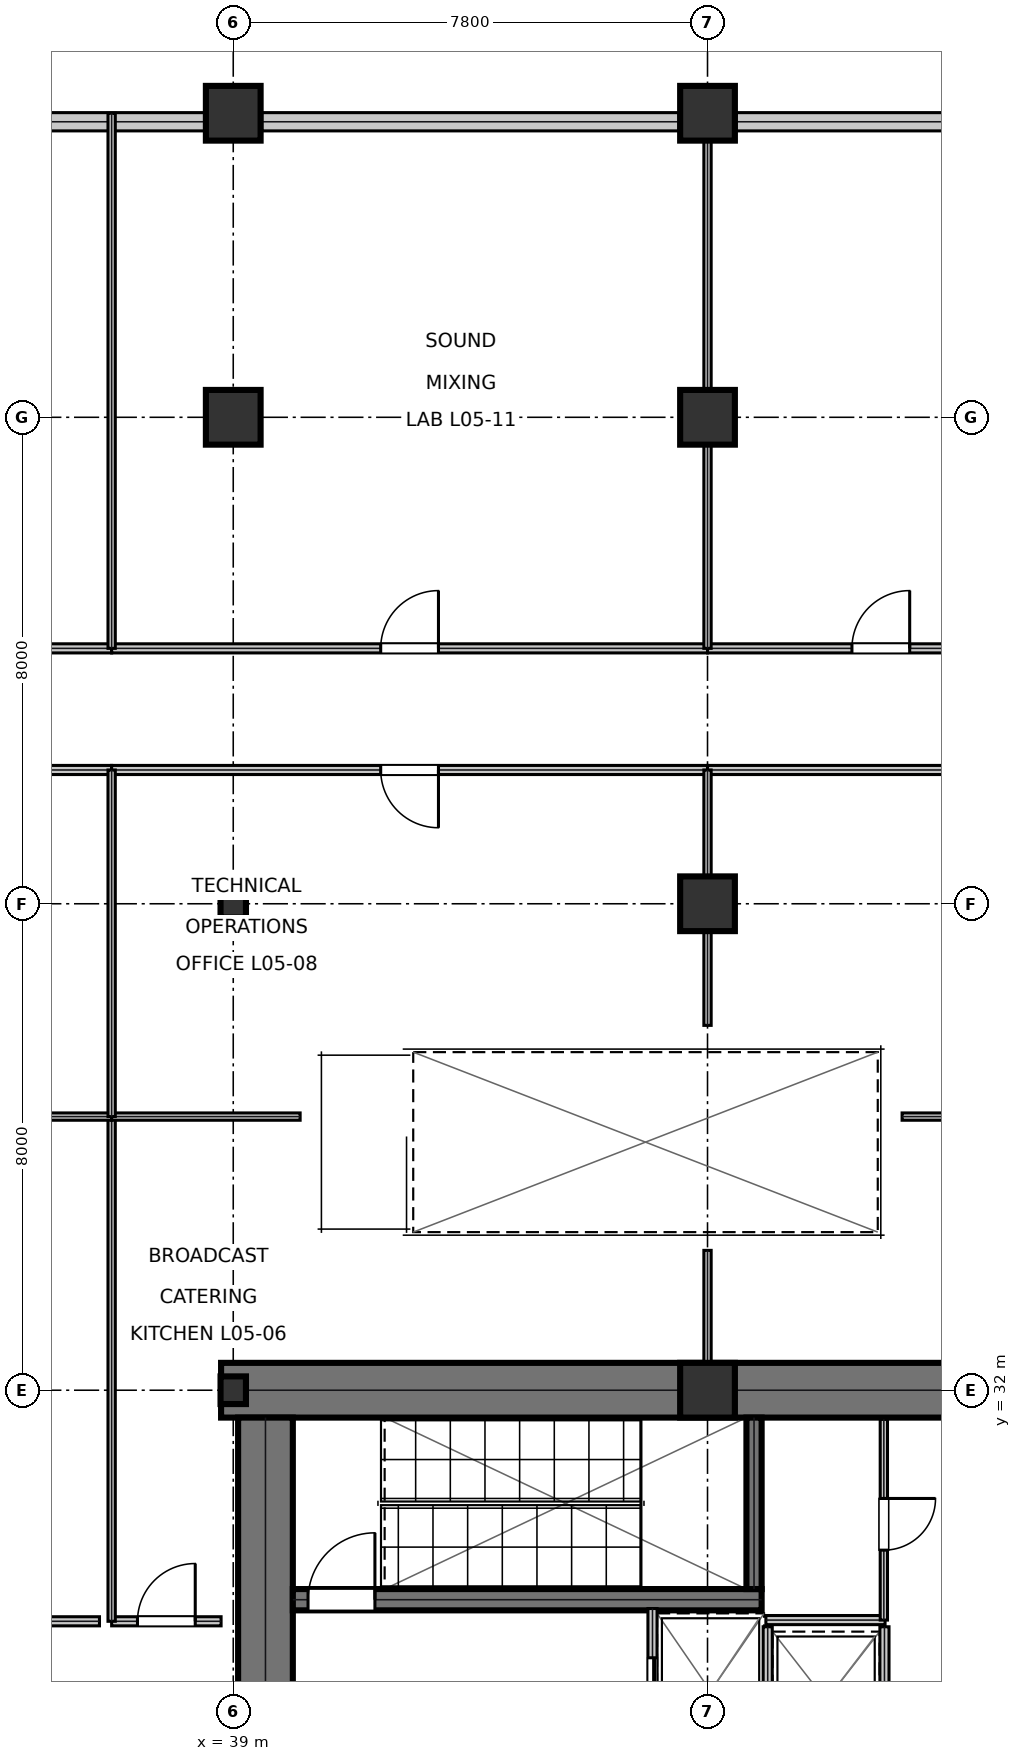
"""IFC4 building model, lengths in metres.
Left out: names, types, materials, properties, quantities, classifications, styles, units other than length and angle.
Written with IfcOpenShell. Run it as: python <this file> out.ifc"""

import sys

from ifc_helpers import new_model, si_unit, direction, frame, frame_2d, origin, origin_2d, place, context, subcontext, project, spatial, rectangle, i_section, extrude, element, fill, save


model = new_model("IFC4")
c1 = context("Model", 3, precision=1e-05, world=origin(), true_north=direction((0.0, 1.0)))
c2 = subcontext(c1, "Body", "Model", "MODEL_VIEW")
j1 = project(units=[si_unit("LENGTHUNIT", "METRE"), si_unit("PLANEANGLEUNIT", "RADIAN")], contexts=[c1])
p1 = place(None, origin())
s1 = spatial("IfcSite", under=j1, at=p1, CompositionType="ELEMENT")
p2 = place(p1, origin())
s2 = spatial("IfcBuilding", under=s1, at=p2, CompositionType="ELEMENT")
p3 = place(p2, frame((0.0, 0.0, 27.0)))
s3 = spatial("IfcBuildingStorey", under=s2, at=p3, CompositionType="ELEMENT", Elevation=27.0)
p4 = place(p3, frame((38.8, 32.0, 0.0), z_axis=(0.0, 0.0, 1.0), x_axis=(1.0, 0.0, 0.0)))
e1 = element("IfcWall", 1, at=p4, inside=s3, PredefinedType="SHEAR", context=c2, shape_type="SweptSolid", body=[
    extrude(rectangle(XDim=16.0, YDim=0.9, at=frame_2d((8.0, 0.0))), origin(), (0.0, 0.0, 1.0), 5.08),
])
p5 = place(p3, frame((39.53, 25.4, 0.0), z_axis=(0.0, 0.0, 1.0), x_axis=(0.0, 1.0, 0.0)))
e2 = element("IfcWall", 2, at=p5, inside=s3, PredefinedType="SHEAR", context=c2, shape_type="SweptSolid", body=[
    extrude(rectangle(XDim=6.15, YDim=0.9, at=frame_2d((3.075, 0.0))), origin(), (0.0, 0.0, 1.0), 5.08),
])
p6 = place(p3, frame((39.98, 28.555, 0.0), z_axis=(0.0, 0.0, 1.0), x_axis=(1.0, 0.0, 0.0)))
e3 = element("IfcWall", 3, at=p6, inside=s3, PredefinedType="SHEAR", context=c2, shape_type="SweptSolid", body=[
    extrude(rectangle(XDim=7.71, YDim=0.35, at=frame_2d((3.855, 0.0))), origin(), (0.0, 0.0, 1.0), 5.08),
])
p7 = place(p6, frame((0.25, 0.0, 0.0)))
e4 = element("IfcOpeningElement", 4, at=p7, cuts=e3, PredefinedType="OPENING", context=c2, shape_type="SweptSolid", body=[
    extrude(rectangle(XDim=1.1, YDim=2.15, at=frame_2d((0.55, 1.075))), frame((0.0, 0.185, 0.0), z_axis=(0.0, -1.0, 0.0), x_axis=(1.0, 0.0, 0.0)), (0.0, 0.0, 1.0), 0.37),
])
p8 = place(p3, frame((47.565, 28.73, 0.0), z_axis=(0.0, 0.0, 1.0), x_axis=(0.0, 1.0, 0.0)))
e5 = element("IfcWall", 5, at=p8, inside=s3, PredefinedType="SHEAR", context=c2, shape_type="SweptSolid", body=[
    extrude(rectangle(XDim=2.82, YDim=0.25, at=frame_2d((1.41, 0.0))), origin(), (0.0, 0.0, 1.0), 5.08),
])
for number, where, z_axis, x_axis in (
    (6, (39.0, 32.0, 0.0), (0.0, 0.0, 1.0), (1.0, 0.0, 0.0)),
    (7, (39.0, 40.0, 0.0), (0.0, 0.0, 1.0), (1.0, 0.0, 0.0)),
):
    element("IfcColumn", number, at=place(p3, frame(where, z_axis=z_axis, x_axis=x_axis)), inside=s3, PredefinedType="COLUMN", context=c2, shape_type="SweptSolid", body=[
        extrude(i_section(OverallWidth=0.418, OverallDepth=0.455, WebThickness=0.042, FlangeThickness=0.068, at=origin_2d()), origin(), (0.0, 0.0, 1.0), 5.395),
    ])
for number, where, z_axis, x_axis in (
    (8, (39.0, 48.0, 0.0), (0.0, 0.0, 1.0), (1.0, 0.0, 0.0)),
    (9, (39.0, 53.0, 0.0), (0.0, 0.0, 1.0), (1.0, 0.0, 0.0)),
    (10, (46.8, 32.0, 0.0), (0.0, 0.0, 1.0), (1.0, 0.0, 0.0)),
    (11, (46.8, 40.0, 0.0), (0.0, 0.0, 1.0), (1.0, 0.0, 0.0)),
    (12, (46.8, 48.0, 0.0), (0.0, 0.0, 1.0), (1.0, 0.0, 0.0)),
    (13, (46.8, 53.0, 0.0), (0.0, 0.0, 1.0), (1.0, 0.0, 0.0)),
):
    element("IfcColumn", number, at=place(p3, frame(where, z_axis=z_axis, x_axis=x_axis)), inside=s3, PredefinedType="COLUMN", context=c2, shape_type="SweptSolid", body=[
        extrude(rectangle(XDim=0.9, YDim=0.9, at=origin_2d()), origin(), (0.0, 0.0, 1.0), 5.395),
    ])
for number, where, z_axis, x_axis in (
    (14, (54.132, 52.86, 0.0), (0.0, 0.0, 1.0), (-1.0, 0.0, 0.0)),
    (15, (46.332, 52.86, 0.0), (0.0, 0.0, 1.0), (-1.0, 0.0, 0.0)),
    (16, (38.532, 52.86, 0.0), (0.0, 0.0, 1.0), (-1.0, 0.0, 0.0)),
):
    element("IfcWall", number, at=place(p3, frame(where, z_axis=z_axis, x_axis=x_axis)), inside=s3, PredefinedType="STANDARD", context=c2, shape_type="SweptSolid", body=[
        extrude(rectangle(XDim=6.864, YDim=0.3, at=frame_2d((3.432, 0.0))), origin(), (0.0, 0.0, 1.0), 4.608),
    ])
p9 = place(p3, frame((45.895, 25.69, 0.0), z_axis=(0.0, 0.0, 1.0), x_axis=(0.0, 1.0, 0.0)))
e17 = element("IfcWall", 17, at=p9, inside=s3, PredefinedType="PARTITIONING", context=c2, shape_type="SweptSolid", body=[
    extrude(rectangle(XDim=2.72, YDim=0.15, at=frame_2d((1.36, 0.0))), origin(), (0.0, 0.0, 1.0), 5.08),
])
p10 = place(p9, frame((0.81, 0.0, 0.0)))
e18 = element("IfcOpeningElement", 18, at=p10, cuts=e17, PredefinedType="OPENING", context=c2, shape_type="SweptSolid", body=[
    extrude(rectangle(XDim=1.1, YDim=2.15, at=frame_2d((0.55, 1.075))), frame((0.0, 0.085, 0.0), z_axis=(0.0, -1.0, 0.0), x_axis=(1.0, 0.0, 0.0)), (0.0, 0.0, 1.0), 0.17),
])
for number, where, z_axis, x_axis in (
    (19, (47.79, 25.695, 0.0), (0.0, 0.0, 1.0), (0.0, 1.0, 0.0)),
    (20, (49.71, 25.695, 0.0), (0.0, 0.0, 1.0), (0.0, 1.0, 0.0)),
):
    element("IfcWall", number, at=place(p3, frame(where, z_axis=z_axis, x_axis=x_axis)), inside=s3, PredefinedType="PARTITIONING", context=c2, shape_type="SweptSolid", body=[
        extrude(rectangle(XDim=2.415, YDim=0.15, at=frame_2d((1.208, 0.0))), origin(), (0.0, 0.0, 1.0), 5.08),
    ])
p11 = place(p3, frame((47.76, 28.22, 0.0), z_axis=(0.0, 0.0, 1.0), x_axis=(1.0, 0.0, 0.0)))
e21 = element("IfcWall", 21, at=p11, inside=s3, PredefinedType="PARTITIONING", context=c2, shape_type="SweptSolid", body=[
    extrude(rectangle(XDim=1.96, YDim=0.15, at=frame_2d((0.98, 0.0))), origin(), (0.0, 0.0, 1.0), 5.08),
])
p12 = place(p3, frame((49.7, 28.22, 0.0), z_axis=(0.0, 0.0, 1.0), x_axis=(0.0, 1.0, 0.0)))
e22 = element("IfcWall", 22, at=p12, inside=s3, PredefinedType="PARTITIONING", context=c2, shape_type="SweptSolid", body=[
    extrude(rectangle(XDim=3.3, YDim=0.12, at=frame_2d((1.65, 0.0))), origin(), (0.0, 0.0, 1.0), 5.08),
])
p13 = place(p12, frame((1.15, 0.0, 0.0)))
e23 = element("IfcOpeningElement", 23, at=p13, cuts=e22, PredefinedType="OPENING", context=c2, shape_type="SweptSolid", body=[
    extrude(rectangle(XDim=0.85, YDim=2.15, at=frame_2d((0.425, 1.075))), frame((0.0, 0.07, 0.0), z_axis=(0.0, -1.0, 0.0), x_axis=(1.0, 0.0, 0.0)), (0.0, 0.0, 1.0), 0.14),
])
p14 = place(p3, frame((28.2, 28.2, 0.0), z_axis=(0.0, 0.0, 1.0), x_axis=(1.0, 0.0, 0.0)))
e24 = element("IfcWall", 24, at=p14, inside=s3, PredefinedType="PARTITIONING", context=c2, shape_type="SweptSolid", body=[
    extrude(rectangle(XDim=8.6, YDim=0.15, at=frame_2d((4.3, 0.0))), origin(), (0.0, 0.0, 1.0), 4.375),
])
p15 = place(p14, frame((3.825, 0.0, 0.0)))
e25 = element("IfcOpeningElement", 25, at=p15, cuts=e24, PredefinedType="OPENING", context=c2, shape_type="SweptSolid", body=[
    extrude(rectangle(XDim=0.95, YDim=2.15, at=frame_2d((0.475, 1.075))), frame((0.0, 0.085, 0.0), z_axis=(0.0, -1.0, 0.0), x_axis=(1.0, 0.0, 0.0)), (0.0, 0.0, 1.0), 0.17),
])
p16 = place(p3, frame((37.0, 28.2, 0.0), z_axis=(0.0, 0.0, 1.0), x_axis=(1.0, 0.0, 0.0)))
e26 = element("IfcWall", 26, at=p16, inside=s3, PredefinedType="PARTITIONING", context=c2, shape_type="SweptSolid", body=[
    extrude(rectangle(XDim=1.8, YDim=0.15, at=frame_2d((0.9, 0.0))), origin(), (0.0, 0.0, 1.0), 5.08),
])
p17 = place(p16, frame((0.425, 0.0, 0.0)))
e27 = element("IfcOpeningElement", 27, at=p17, cuts=e26, PredefinedType="OPENING", context=c2, shape_type="SweptSolid", body=[
    extrude(rectangle(XDim=0.95, YDim=2.15, at=frame_2d((0.475, 1.075))), frame((0.0, 0.085, 0.0), z_axis=(0.0, -1.0, 0.0), x_axis=(1.0, 0.0, 0.0)), (0.0, 0.0, 1.0), 0.17),
])
p18 = place(p3, frame((28.2, 42.2, 0.0), z_axis=(0.0, 0.0, 1.0), x_axis=(1.0, 0.0, 0.0)))
e28 = element("IfcWall", 28, at=p18, inside=s3, PredefinedType="PARTITIONING", context=c2, shape_type="SweptSolid", body=[
    extrude(rectangle(XDim=8.8, YDim=0.15, at=frame_2d((4.4, 0.0))), origin(), (0.0, 0.0, 1.0), 4.375),
])
p19 = place(p18, frame((3.925, 0.0, 0.0)))
e29 = element("IfcOpeningElement", 29, at=p19, cuts=e28, PredefinedType="OPENING", context=c2, shape_type="SweptSolid", body=[
    extrude(rectangle(XDim=0.95, YDim=2.15, at=frame_2d((0.475, 1.075))), frame((0.0, 0.085, 0.0), z_axis=(0.0, -1.0, 0.0), x_axis=(1.0, 0.0, 0.0)), (0.0, 0.0, 1.0), 0.17),
])
p20 = place(p3, frame((37.0, 42.2, 0.0), z_axis=(0.0, 0.0, 1.0), x_axis=(1.0, 0.0, 0.0)))
e30 = element("IfcWall", 30, at=p20, inside=s3, PredefinedType="PARTITIONING", context=c2, shape_type="SweptSolid", body=[
    extrude(rectangle(XDim=9.8, YDim=0.15, at=frame_2d((4.9, 0.0))), origin(), (0.0, 0.0, 1.0), 4.375),
])
p21 = place(p20, frame((4.425, 0.0, 0.0)))
e31 = element("IfcOpeningElement", 31, at=p21, cuts=e30, PredefinedType="OPENING", context=c2, shape_type="SweptSolid", body=[
    extrude(rectangle(XDim=0.95, YDim=2.15, at=frame_2d((0.475, 1.075))), frame((0.0, 0.085, 0.0), z_axis=(0.0, -1.0, 0.0), x_axis=(1.0, 0.0, 0.0)), (0.0, 0.0, 1.0), 0.17),
])
p22 = place(p3, frame((46.8, 44.2, 0.0), z_axis=(0.0, 0.0, 1.0), x_axis=(1.0, 0.0, 0.0)))
e32 = element("IfcWall", 32, at=p22, inside=s3, PredefinedType="PARTITIONING", context=c2, shape_type="SweptSolid", body=[
    extrude(rectangle(XDim=5.7, YDim=0.15, at=frame_2d((2.85, 0.0))), origin(), (0.0, 0.0, 1.0), 4.375),
])
p23 = place(p22, frame((2.375, 0.0, 0.0)))
e33 = element("IfcOpeningElement", 33, at=p23, cuts=e32, PredefinedType="OPENING", context=c2, shape_type="SweptSolid", body=[
    extrude(rectangle(XDim=0.95, YDim=2.15, at=frame_2d((0.475, 1.075))), frame((0.0, 0.085, 0.0), z_axis=(0.0, -1.0, 0.0), x_axis=(1.0, 0.0, 0.0)), (0.0, 0.0, 1.0), 0.17),
])
p24 = place(p3, frame((28.2, 44.2, 0.0), z_axis=(0.0, 0.0, 1.0), x_axis=(1.0, 0.0, 0.0)))
e34 = element("IfcWall", 34, at=p24, inside=s3, PredefinedType="PARTITIONING", context=c2, shape_type="SweptSolid", body=[
    extrude(rectangle(XDim=8.8, YDim=0.15, at=frame_2d((4.4, 0.0))), origin(), (0.0, 0.0, 1.0), 4.375),
])
p25 = place(p24, frame((3.925, 0.0, 0.0)))
e35 = element("IfcOpeningElement", 35, at=p25, cuts=e34, PredefinedType="OPENING", context=c2, shape_type="SweptSolid", body=[
    extrude(rectangle(XDim=0.95, YDim=2.15, at=frame_2d((0.475, 1.075))), frame((0.0, 0.085, 0.0), z_axis=(0.0, -1.0, 0.0), x_axis=(1.0, 0.0, 0.0)), (0.0, 0.0, 1.0), 0.17),
])
p26 = place(p3, frame((37.0, 44.2, 0.0), z_axis=(0.0, 0.0, 1.0), x_axis=(1.0, 0.0, 0.0)))
e36 = element("IfcWall", 36, at=p26, inside=s3, PredefinedType="PARTITIONING", context=c2, shape_type="SweptSolid", body=[
    extrude(rectangle(XDim=9.8, YDim=0.15, at=frame_2d((4.9, 0.0))), origin(), (0.0, 0.0, 1.0), 4.375),
])
p27 = place(p26, frame((4.425, 0.0, 0.0)))
e37 = element("IfcOpeningElement", 37, at=p27, cuts=e36, PredefinedType="OPENING", context=c2, shape_type="SweptSolid", body=[
    extrude(rectangle(XDim=0.95, YDim=2.15, at=frame_2d((0.475, 1.075))), frame((0.0, 0.085, 0.0), z_axis=(0.0, -1.0, 0.0), x_axis=(1.0, 0.0, 0.0)), (0.0, 0.0, 1.0), 0.17),
])
p28 = place(p3, frame((46.8, 42.2, 0.0), z_axis=(0.0, 0.0, 1.0), x_axis=(1.0, 0.0, 0.0)))
e38 = element("IfcWall", 38, at=p28, inside=s3, PredefinedType="PARTITIONING", context=c2, shape_type="SweptSolid", body=[
    extrude(rectangle(XDim=5.7, YDim=0.15, at=frame_2d((2.85, 0.0))), origin(), (0.0, 0.0, 1.0), 4.375),
])
p29 = place(p3, frame((46.8, 32.4, 0.0), z_axis=(0.0, 0.0, 1.0), x_axis=(0.0, 1.0, 0.0)))
e39 = element("IfcWall", 39, at=p29, inside=s3, PredefinedType="PARTITIONING", context=c2, shape_type="SweptSolid", body=[
    extrude(rectangle(XDim=1.9, YDim=0.12, at=frame_2d((0.95, 0.0))), origin(), (0.0, 0.0, 1.0), 4.375),
])
p30 = place(p3, frame((50.0, 36.5, 0.0), z_axis=(0.0, 0.0, 1.0), x_axis=(1.0, 0.0, 0.0)))
e40 = element("IfcWall", 40, at=p30, inside=s3, PredefinedType="PARTITIONING", context=c2, shape_type="SweptSolid", body=[
    extrude(rectangle(XDim=12.4, YDim=0.12, at=frame_2d((6.2, 0.0))), origin(), (0.0, 0.0, 1.0), 4.375),
])
p31 = place(p3, frame((37.0, 28.2, 0.0), z_axis=(0.0, 0.0, 1.0), x_axis=(0.0, 1.0, 0.0)))
e41 = element("IfcWall", 41, at=p31, inside=s3, PredefinedType="PARTITIONING", context=c2, shape_type="SweptSolid", body=[
    extrude(rectangle(XDim=8.3, YDim=0.12, at=frame_2d((4.15, 0.0))), origin(), (0.0, 0.0, 1.0), 4.298),
])
p32 = place(p3, frame((28.2, 36.5, 0.0), z_axis=(0.0, 0.0, 1.0), x_axis=(1.0, 0.0, 0.0)))
e42 = element("IfcWall", 42, at=p32, inside=s3, PredefinedType="PARTITIONING", context=c2, shape_type="SweptSolid", body=[
    extrude(rectangle(XDim=8.8, YDim=0.12, at=frame_2d((4.4, 0.0))), origin(), (0.0, 0.0, 1.0), 4.375),
])
p33 = place(p3, frame((37.0, 36.5, 0.0), z_axis=(0.0, 0.0, 1.0), x_axis=(1.0, 0.0, 0.0)))
e43 = element("IfcWall", 43, at=p33, inside=s3, PredefinedType="PARTITIONING", context=c2, shape_type="SweptSolid", body=[
    extrude(rectangle(XDim=3.1, YDim=0.12, at=frame_2d((1.55, 0.0))), origin(), (0.0, 0.0, 1.0), 4.375),
])
p34 = place(p3, frame((37.0, 36.5, 0.0), z_axis=(0.0, 0.0, 1.0), x_axis=(0.0, 1.0, 0.0)))
e44 = element("IfcWall", 44, at=p34, inside=s3, PredefinedType="PARTITIONING", context=c2, shape_type="SweptSolid", body=[
    extrude(rectangle(XDim=5.7, YDim=0.12, at=frame_2d((2.85, 0.0))), origin(), (0.0, 0.0, 1.0), 4.298),
])
p35 = place(p3, frame((46.8, 38.0, 0.0), z_axis=(0.0, 0.0, 1.0), x_axis=(0.0, 1.0, 0.0)))
e45 = element("IfcWall", 45, at=p35, inside=s3, PredefinedType="PARTITIONING", context=c2, shape_type="SweptSolid", body=[
    extrude(rectangle(XDim=4.2, YDim=0.12, at=frame_2d((2.1, 0.0))), origin(), (0.0, 0.0, 1.0), 4.298),
])
for number, where, z_axis, x_axis in (
    (46, (46.8, 44.2, 0.0), (0.0, 0.0, 1.0), (0.0, 1.0, 0.0)),
    (47, (37.0, 44.2, 0.0), (0.0, 0.0, 1.0), (0.0, 1.0, 0.0)),
):
    element("IfcWall", number, at=place(p3, frame(where, z_axis=z_axis, x_axis=x_axis)), inside=s3, PredefinedType="PARTITIONING", context=c2, shape_type="SweptSolid", body=[
        extrude(rectangle(XDim=8.8, YDim=0.12, at=frame_2d((4.4, 0.0))), origin(), (0.0, 0.0, 1.0), 4.298),
    ])
p36 = place(p10, frame((1.1, 0.0, 0.0), z_axis=(0.0, 0.0, 1.0), x_axis=(-1.0, 0.0, 0.0)))
e48 = element("IfcDoor", 48, at=p36, inside=s3, OperationType="DOUBLE_DOOR_SLIDING", PredefinedType="DOOR", context=c2, shape_type="SweptSolid", body=[
    extrude(rectangle(XDim=1.1, YDim=2.15, at=frame_2d((0.55, 1.075))), frame((0.0, 0.025, 0.0), z_axis=(0.0, -1.0, 0.0), x_axis=(1.0, 0.0, 0.0)), (0.0, 0.0, 1.0), 0.05),
])
fill(e18, e48)
p37 = place(p13, frame((0.85, 0.0, 0.0), z_axis=(0.0, 0.0, 1.0), x_axis=(-1.0, 0.0, 0.0)))
e49 = element("IfcDoor", 49, at=p37, inside=s3, OperationType="SINGLE_SWING_LEFT", PredefinedType="DOOR", context=c2, shape_type="SweptSolid", body=[
    extrude(rectangle(XDim=0.85, YDim=2.15, at=frame_2d((0.425, 1.075))), frame((0.0, 0.025, 0.0), z_axis=(0.0, -1.0, 0.0), x_axis=(1.0, 0.0, 0.0)), (0.0, 0.0, 1.0), 0.05),
])
fill(e23, e49)
p38 = place(p17, origin())
e50 = element("IfcDoor", 50, at=p38, inside=s3, OperationType="SINGLE_SWING_RIGHT", PredefinedType="DOOR", context=c2, shape_type="SweptSolid", body=[
    extrude(rectangle(XDim=0.95, YDim=2.15, at=frame_2d((0.475, 1.075))), frame((0.0, 0.025, 0.0), z_axis=(0.0, -1.0, 0.0), x_axis=(1.0, 0.0, 0.0)), (0.0, 0.0, 1.0), 0.05),
])
fill(e27, e50)
p39 = place(p21, frame((0.95, 0.0, 0.0), z_axis=(0.0, 0.0, 1.0), x_axis=(-1.0, 0.0, 0.0)))
e51 = element("IfcDoor", 51, at=p39, inside=s3, OperationType="SINGLE_SWING_LEFT", PredefinedType="DOOR", context=c2, shape_type="SweptSolid", body=[
    extrude(rectangle(XDim=0.95, YDim=2.15, at=frame_2d((0.475, 1.075))), frame((0.0, 0.025, 0.0), z_axis=(0.0, -1.0, 0.0), x_axis=(1.0, 0.0, 0.0)), (0.0, 0.0, 1.0), 0.05),
])
fill(e31, e51)
p40 = place(p23, origin())
e52 = element("IfcDoor", 52, at=p40, inside=s3, OperationType="SINGLE_SWING_RIGHT", PredefinedType="DOOR", context=c2, shape_type="SweptSolid", body=[
    extrude(rectangle(XDim=0.95, YDim=2.15, at=frame_2d((0.475, 1.075))), frame((0.0, 0.025, 0.0), z_axis=(0.0, -1.0, 0.0), x_axis=(1.0, 0.0, 0.0)), (0.0, 0.0, 1.0), 0.05),
])
fill(e33, e52)
p41 = place(p27, origin())
e53 = element("IfcDoor", 53, at=p41, inside=s3, OperationType="SINGLE_SWING_RIGHT", PredefinedType="DOOR", context=c2, shape_type="SweptSolid", body=[
    extrude(rectangle(XDim=0.95, YDim=2.15, at=frame_2d((0.475, 1.075))), frame((0.0, 0.025, 0.0), z_axis=(0.0, -1.0, 0.0), x_axis=(1.0, 0.0, 0.0)), (0.0, 0.0, 1.0), 0.05),
])
fill(e37, e53)
p42 = place(p7, origin())
e54 = element("IfcDoor", 54, at=p42, inside=s3, OperationType="SINGLE_SWING_RIGHT", PredefinedType="DOOR", context=c2, shape_type="SweptSolid", body=[
    extrude(rectangle(XDim=1.1, YDim=2.15, at=frame_2d((0.55, 1.075))), frame((0.0, 0.025, 0.0), z_axis=(0.0, -1.0, 0.0), x_axis=(1.0, 0.0, 0.0)), (0.0, 0.0, 1.0), 0.05),
])
fill(e4, e54)
save(model, sys.argv[1])
